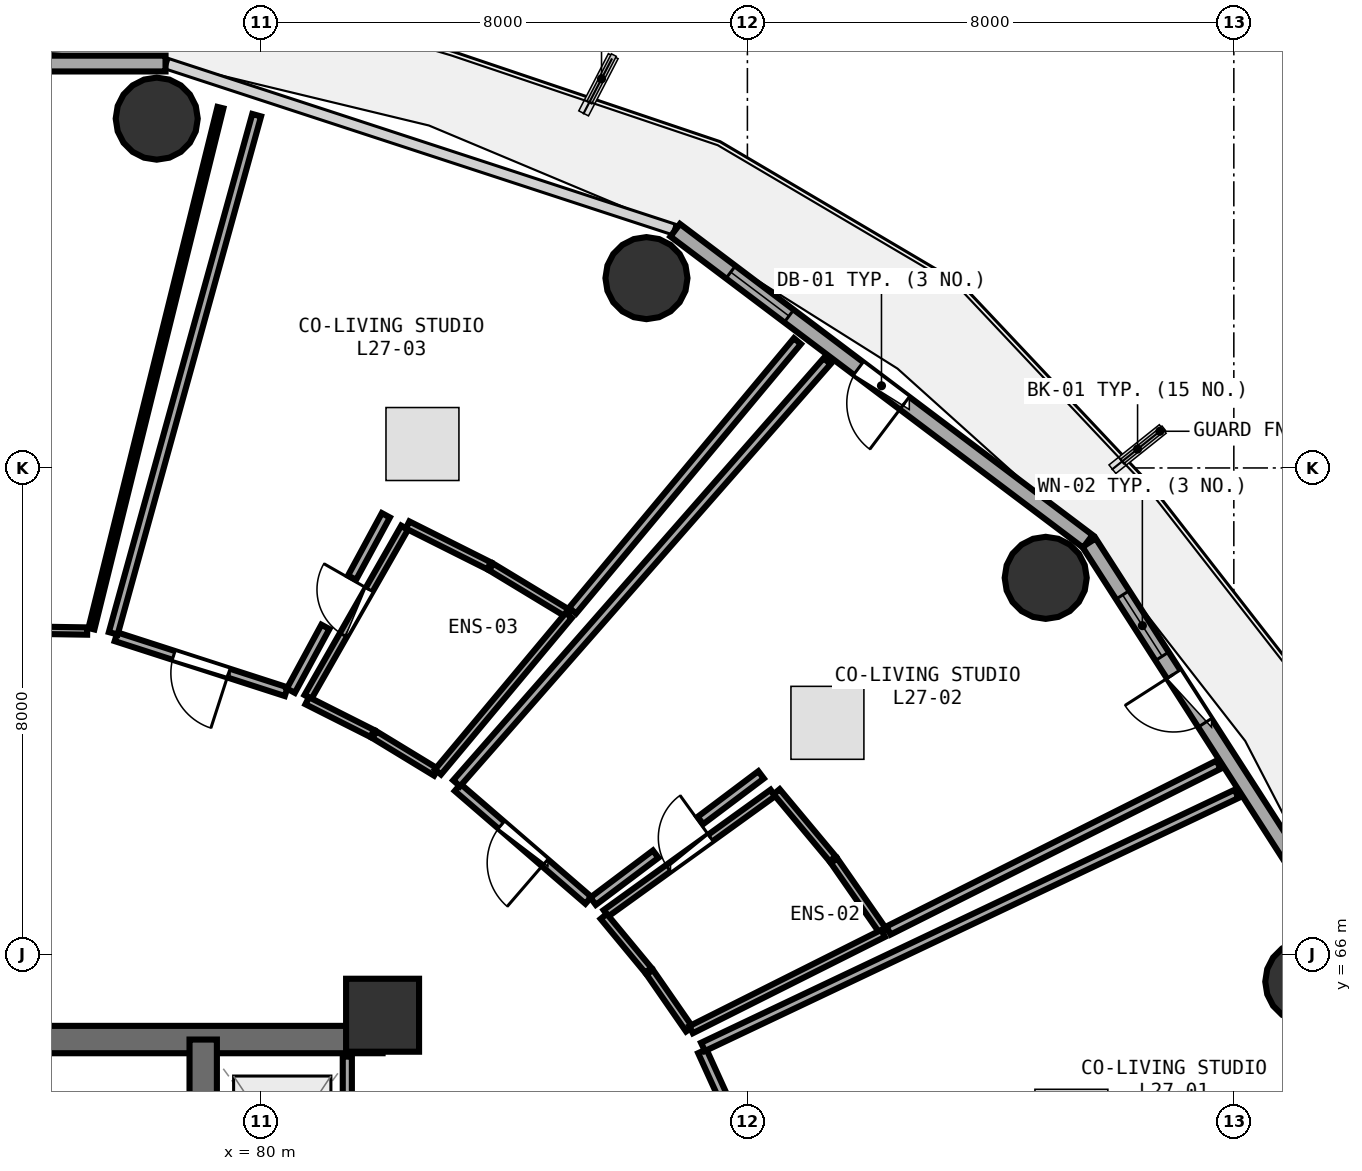
"""IFC4 building model, lengths in metres.
Left out: names, types, materials, properties, quantities, classifications, styles, units other than length and angle.
Written with IfcOpenShell. Run it as: python <this file> out.ifc"""

import sys

from ifc_helpers import new_model, si_unit, direction, frame, frame_2d, origin, origin_2d, place, context, subcontext, project, spatial, rectangle, circle, extrude, element, fill, save


model = new_model("IFC4")
c1 = context("Model", 3, precision=1e-05, world=origin(), true_north=direction((0.0, 1.0)))
c2 = subcontext(c1, "Body", "Model", "MODEL_VIEW")
j1 = project(units=[si_unit("LENGTHUNIT", "METRE"), si_unit("PLANEANGLEUNIT", "RADIAN")], contexts=[c1])
p1 = place(None, origin())
s1 = spatial("IfcSite", under=j1, at=p1, CompositionType="ELEMENT")
p2 = place(p1, origin())
s2 = spatial("IfcBuilding", under=s1, at=p2, CompositionType="ELEMENT")
p3 = place(p2, frame((0.0, 0.0, 106.35)))
s3 = spatial("IfcBuildingStorey", under=s2, at=p3, CompositionType="ELEMENT", Elevation=106.35)
p4 = place(p3, frame((82.0, 65.0, 0.0), z_axis=(0.0, 0.0, 1.0), x_axis=(1.0, 0.0, 0.0)))
e1 = element("IfcColumn", 1, at=p4, inside=s3, PredefinedType="PILASTER", context=c2, shape_type="SweptSolid", body=[
    extrude(rectangle(XDim=1.2, YDim=1.2, at=origin_2d()), origin(), (0.0, 0.0, 1.0), 3.75),
])
for number, where, z_axis, x_axis in (
    (2, (97.192, 65.552, 0.0), (0.0, 0.0, 1.0), (1.0, 0.0, 0.0)),
    (3, (92.906, 72.193, 0.0), (0.0, 0.0, 1.0), (1.0, 0.0, 0.0)),
    (4, (86.34, 77.122, 0.0), (0.0, 0.0, 1.0), (1.0, 0.0, 0.0)),
    (5, (78.286, 79.745, 0.0), (0.0, 0.0, 1.0), (1.0, 0.0, 0.0)),
):
    element("IfcColumn", number, at=place(p3, frame(where, z_axis=z_axis, x_axis=x_axis)), inside=s3, PredefinedType="COLUMN", context=c2, shape_type="SweptSolid", body=[
        extrude(circle(Radius=0.675, at=origin_2d()), origin(), (0.0, 0.0, 1.0), 3.75),
    ])
p5 = place(p3, frame((98.048, 65.879, 0.0), z_axis=(0.0, 0.0, 1.0), x_axis=(-0.540620528459, 0.841266571432, 0.0)))
e6 = element("IfcWall", 6, at=p5, inside=s3, PredefinedType="SOLIDWALL", context=c2, shape_type="SweptSolid", body=[
    extrude(rectangle(XDim=8.193, YDim=0.26, at=frame_2d((4.096, 0.0))), origin(), (0.0, 0.0, 1.0), 3.475),
])
p6 = place(p5, frame((4.671, 0.0, 0.0)))
e7 = element("IfcOpeningElement", 7, at=p6, cuts=e6, PredefinedType="OPENING", context=c2, shape_type="SweptSolid", body=[
    extrude(rectangle(XDim=0.95, YDim=2.1, at=frame_2d((0.475, 1.05))), frame((0.0, 0.14, 0.0), z_axis=(0.0, -1.0, 0.0), x_axis=(1.0, 0.0, 0.0)), (0.0, 0.0, 1.0), 0.28),
])
p7 = place(p5, frame((5.971, 0.0, 0.85)))
e8 = element("IfcOpeningElement", 8, at=p7, cuts=e6, PredefinedType="OPENING", context=c2, shape_type="SweptSolid", body=[
    extrude(rectangle(XDim=1.2, YDim=1.45, at=frame_2d((0.6, 0.725))), frame((0.0, 0.14, 0.0), z_axis=(0.0, -1.0, 0.0), x_axis=(1.0, 0.0, 0.0)), (0.0, 0.0, 1.0), 0.28),
])
p8 = place(p3, frame((93.599, 72.793, 0.0), z_axis=(0.0, 0.0, 1.0), x_axis=(-0.798501507879, 0.601992808857, 0.0)))
e9 = element("IfcWall", 9, at=p8, inside=s3, PredefinedType="SOLIDWALL", context=c2, shape_type="SweptSolid", body=[
    extrude(rectangle(XDim=8.499, YDim=0.26, at=frame_2d((4.25, 0.0))), origin(), (0.0, 0.0, 1.0), 3.475),
])
p9 = place(p8, frame((3.775, 0.0, 0.0)))
e10 = element("IfcOpeningElement", 10, at=p9, cuts=e9, PredefinedType="OPENING", context=c2, shape_type="SweptSolid", body=[
    extrude(rectangle(XDim=0.95, YDim=2.1, at=frame_2d((0.475, 1.05))), frame((0.0, 0.14, 0.0), z_axis=(0.0, -1.0, 0.0), x_axis=(1.0, 0.0, 0.0)), (0.0, 0.0, 1.0), 0.28),
])
p10 = place(p8, frame((6.155, 0.0, 0.85)))
e11 = element("IfcOpeningElement", 11, at=p10, cuts=e9, PredefinedType="OPENING", context=c2, shape_type="SweptSolid", body=[
    extrude(rectangle(XDim=1.2, YDim=1.45, at=frame_2d((0.6, 0.725))), frame((0.0, 0.14, 0.0), z_axis=(0.0, -1.0, 0.0), x_axis=(1.0, 0.0, 0.0)), (0.0, 0.0, 1.0), 0.28),
])
p11 = place(p3, frame((78.43, 80.651, 0.0), z_axis=(0.0, 0.0, 1.0), x_axis=(-1.0, 0.0, 0.0)))
e12 = element("IfcWall", 12, at=p11, inside=s3, PredefinedType="SOLIDWALL", context=c2, shape_type="SweptSolid", body=[
    extrude(rectangle(XDim=8.861, YDim=0.26, at=frame_2d((4.43, 0.0))), origin(), (0.0, 0.0, 1.0), 3.475),
])
p12 = place(p11, frame((3.63, 0.0, 0.85)))
e13 = element("IfcOpeningElement", 13, at=p12, cuts=e12, PredefinedType="OPENING", context=c2, shape_type="SweptSolid", body=[
    extrude(rectangle(XDim=1.6, YDim=1.45, at=frame_2d((0.8, 0.725))), frame((0.0, 0.14, 0.0), z_axis=(0.0, -1.0, 0.0), x_axis=(1.0, 0.0, 0.0)), (0.0, 0.0, 1.0), 0.28),
])
p13 = place(p3, frame((74.0, 64.6, 0.0), z_axis=(0.0, 0.0, 1.0), x_axis=(1.0, 0.0, 0.0)))
e14 = element("IfcWall", 14, at=p13, inside=s3, PredefinedType="SHEAR", context=c2, shape_type="SweptSolid", body=[
    extrude(rectangle(XDim=8.0, YDim=0.45, at=frame_2d((4.0, 0.0))), origin(), (0.0, 0.0, 1.0), 3.49),
])
p14 = place(p3, frame((79.05, 58.3, 0.0), z_axis=(0.0, 0.0, 1.0), x_axis=(0.0, 1.0, 0.0)))
e15 = element("IfcWall", 15, at=p14, inside=s3, PredefinedType="SHEAR", context=c2, shape_type="SweptSolid", body=[
    extrude(rectangle(XDim=6.3, YDim=0.45, at=frame_2d((3.15, 0.0))), origin(), (0.0, 0.0, 1.0), 3.49),
])
p15 = place(p3, frame((81.42, 61.48, 0.0), z_axis=(0.0, 0.0, 1.0), x_axis=(0.0, 1.0, 0.0)))
e16 = element("IfcWall", 16, at=p15, inside=s3, PredefinedType="PARTITIONING", context=c2, shape_type="SweptSolid", body=[
    extrude(rectangle(XDim=2.84, YDim=0.15, at=frame_2d((1.42, 0.0))), origin(), (0.0, 0.0, 1.0), 3.48),
])
p16 = place(p3, frame((88.387, 61.925, 0.0), z_axis=(0.0, 0.0, 1.0), x_axis=(-0.413748987938, 0.910391001153, 0.0)))
e17 = element("IfcWall", 17, at=p16, inside=s3, PredefinedType="PARTITIONING", context=c2, shape_type="SweptSolid", body=[
    extrude(rectangle(XDim=2.727, YDim=0.15, at=frame_2d((1.364, 0.0))), origin(), (0.0, 0.0, 1.0), 3.235),
])
p17 = place(p16, frame((0.889, 0.0, 0.0)))
e18 = element("IfcOpeningElement", 18, at=p17, cuts=e17, PredefinedType="OPENING", context=c2, shape_type="SweptSolid", body=[
    extrude(rectangle(XDim=0.95, YDim=2.08, at=frame_2d((0.475, 1.04))), frame((0.0, 0.085, 0.0), z_axis=(0.0, -1.0, 0.0), x_axis=(1.0, 0.0, 0.0)), (0.0, 0.0, 1.0), 0.17),
])
p18 = place(p3, frame((85.673, 66.676, 0.0), z_axis=(0.0, 0.0, 1.0), x_axis=(0.811192287952, 0.584779507137, 0.0)))
e19 = element("IfcWall", 19, at=p18, inside=s3, PredefinedType="PLUMBINGWALL", context=c2, shape_type="SweptSolid", body=[
    extrude(rectangle(XDim=3.386, YDim=0.13, at=frame_2d((1.693, 0.0))), origin(), (0.0, 0.0, 1.0), 3.235),
])
p19 = place(p18, frame((1.263, 0.0, 0.0)))
e20 = element("IfcOpeningElement", 20, at=p19, cuts=e19, PredefinedType="OPENING", context=c2, shape_type="SweptSolid", body=[
    extrude(rectangle(XDim=0.86, YDim=2.05, at=frame_2d((0.43, 1.025))), frame((0.0, 0.075, 0.0), z_axis=(0.0, -1.0, 0.0), x_axis=(1.0, 0.0, 0.0)), (0.0, 0.0, 1.0), 0.15),
])
p20 = place(p3, frame((85.385, 66.89, 0.0), z_axis=(0.0, 0.0, 1.0), x_axis=(-0.756913909666, 0.65351460072, 0.0)))
e21 = element("IfcWall", 21, at=p20, inside=s3, PredefinedType="PARTITIONING", context=c2, shape_type="SweptSolid", body=[
    extrude(rectangle(XDim=2.838, YDim=0.15, at=frame_2d((1.419, 0.0))), origin(), (0.0, 0.0, 1.0), 2.925),
])
p21 = place(p20, frame((0.944, 0.0, 0.0)))
e22 = element("IfcOpeningElement", 22, at=p21, cuts=e21, PredefinedType="OPENING", context=c2, shape_type="SweptSolid", body=[
    extrude(rectangle(XDim=0.95, YDim=2.08, at=frame_2d((0.475, 1.04))), frame((0.0, 0.085, 0.0), z_axis=(0.0, -1.0, 0.0), x_axis=(1.0, 0.0, 0.0)), (0.0, 0.0, 1.0), 0.17),
])
p22 = place(p3, frame((80.773, 70.233, 0.0), z_axis=(0.0, 0.0, 1.0), x_axis=(0.49568821927, 0.868500540747, 0.0)))
e23 = element("IfcWall", 23, at=p22, inside=s3, PredefinedType="PLUMBINGWALL", context=c2, shape_type="SweptSolid", body=[
    extrude(rectangle(XDim=3.209, YDim=0.13, at=frame_2d((1.604, 0.0))), origin(), (0.0, 0.0, 1.0), 2.925),
])
p23 = place(p22, frame((1.174, 0.0, 0.0)))
e24 = element("IfcOpeningElement", 24, at=p23, cuts=e23, PredefinedType="OPENING", context=c2, shape_type="SweptSolid", body=[
    extrude(rectangle(XDim=0.86, YDim=2.05, at=frame_2d((0.43, 1.025))), frame((0.0, 0.075, 0.0), z_axis=(0.0, -1.0, 0.0), x_axis=(1.0, 0.0, 0.0)), (0.0, 0.0, 1.0), 0.15),
])
p24 = place(p3, frame((80.415, 70.32, 0.0), z_axis=(0.0, 0.0, 1.0), x_axis=(-0.951622481895, 0.307269673009, 0.0)))
e25 = element("IfcWall", 25, at=p24, inside=s3, PredefinedType="PARTITIONING", context=c2, shape_type="SweptSolid", body=[
    extrude(rectangle(XDim=2.94, YDim=0.15, at=frame_2d((1.47, 0.0))), origin(), (0.0, 0.0, 1.0), 3.235),
])
p25 = place(p24, frame((0.995, 0.0, 0.0)))
e26 = element("IfcOpeningElement", 26, at=p25, cuts=e25, PredefinedType="OPENING", context=c2, shape_type="SweptSolid", body=[
    extrude(rectangle(XDim=0.95, YDim=2.08, at=frame_2d((0.475, 1.04))), frame((0.0, 0.085, 0.0), z_axis=(0.0, -1.0, 0.0), x_axis=(1.0, 0.0, 0.0)), (0.0, 0.0, 1.0), 0.17),
])
p26 = place(p3, frame((77.142, 71.318, 0.0), z_axis=(0.0, 0.0, 1.0), x_axis=(-0.999874771211, 0.015825356091, 0.0)))
e27 = element("IfcWall", 27, at=p26, inside=s3, PredefinedType="PARTITIONING", context=c2, shape_type="SweptSolid", body=[
    extrude(rectangle(XDim=5.77, YDim=0.12, at=frame_2d((2.885, 0.0))), origin(), (0.0, 0.0, 1.0), 3.48),
])
p27 = place(p26, frame((2.435, 0.0, 0.0)))
e28 = element("IfcOpeningElement", 28, at=p27, cuts=e27, PredefinedType="OPENING", context=c2, shape_type="SweptSolid", body=[
    extrude(rectangle(XDim=0.9, YDim=2.08, at=frame_2d((0.45, 1.04))), frame((0.0, 0.07, 0.0), z_axis=(0.0, -1.0, 0.0), x_axis=(1.0, 0.0, 0.0)), (0.0, 0.0, 1.0), 0.14),
])
p28 = place(p3, frame((87.27, 64.479, 0.0), z_axis=(0.0, 0.0, 1.0), x_axis=(0.903543765611, 0.428495815178, 0.0)))
e29 = element("IfcWall", 29, at=p28, inside=s3, PredefinedType="PARTITIONING", context=c2, shape_type="SweptSolid", body=[
    extrude(rectangle(XDim=9.713, YDim=0.15, at=frame_2d((4.856, 0.0))), origin(), (0.0, 0.0, 1.0), 2.925),
])
p29 = place(p3, frame((87.045, 64.769, 0.0), z_axis=(0.0, 0.0, 1.0), x_axis=(-0.569710294604, 0.821845593906, 0.0)))
e30 = element("IfcWall", 30, at=p29, inside=s3, PredefinedType="PLUMBINGWALL", context=c2, shape_type="SweptSolid", body=[
    extrude(rectangle(XDim=1.142, YDim=0.13, at=frame_2d((0.571, 0.0))), origin(), (0.0, 0.0, 1.0), 2.925),
])
p30 = place(p3, frame((86.37, 65.74, 0.0), z_axis=(0.0, 0.0, 1.0), x_axis=(-0.63765459476, 0.770322411579, 0.0)))
e31 = element("IfcWall", 31, at=p30, inside=s3, PredefinedType="PLUMBINGWALL", context=c2, shape_type="SweptSolid", body=[
    extrude(rectangle(XDim=1.15, YDim=0.13, at=frame_2d((0.575, 0.0))), origin(), (0.0, 0.0, 1.0), 3.48),
])
p31 = place(p3, frame((88.481, 68.676, 0.0), z_axis=(0.0, 0.0, 1.0), x_axis=(0.640685734907, -0.767803222894, 0.0)))
e32 = element("IfcWall", 32, at=p31, inside=s3, PredefinedType="PLUMBINGWALL", context=c2, shape_type="SweptSolid", body=[
    extrude(rectangle(XDim=1.437, YDim=0.13, at=frame_2d((0.718, 0.0))), origin(), (0.0, 0.0, 1.0), 3.48),
])
p32 = place(p3, frame((89.425, 67.541, 0.0), z_axis=(0.0, 0.0, 1.0), x_axis=(0.571009238548, -0.820943633566, 0.0)))
e33 = element("IfcWall", 33, at=p32, inside=s3, PredefinedType="PLUMBINGWALL", context=c2, shape_type="SweptSolid", body=[
    extrude(rectangle(XDim=1.424, YDim=0.13, at=frame_2d((0.712, 0.0))), origin(), (0.0, 0.0, 1.0), 3.48),
])
p33 = place(p3, frame((90.232, 66.346, 0.0), z_axis=(0.0, 0.0, 1.0), x_axis=(-0.893873710096, -0.448318849034, 0.0)))
e34 = element("IfcWall", 34, at=p33, inside=s3, PredefinedType="PLUMBINGWALL", context=c2, shape_type="SweptSolid", body=[
    extrude(rectangle(XDim=3.533, YDim=0.13, at=frame_2d((1.767, 0.0))), origin(), (0.0, 0.0, 1.0), 2.925),
])
p34 = place(p3, frame((83.217, 68.814, 0.0), z_axis=(0.0, 0.0, 1.0), x_axis=(0.659635901966, 0.751585309088, 0.0)))
e35 = element("IfcWall", 35, at=p34, inside=s3, PredefinedType="PARTITIONING", context=c2, shape_type="SweptSolid", body=[
    extrude(rectangle(XDim=9.237, YDim=0.15, at=frame_2d((4.619, 0.0))), origin(), (0.0, 0.0, 1.0), 2.925),
])
p35 = place(p3, frame((95.749, 69.12, 0.0), z_axis=(0.0, 0.0, 1.0), x_axis=(-0.89358164897, -0.448900697954, 0.0)))
e36 = element("IfcWall", 36, at=p35, inside=s3, PredefinedType="PARTITIONING", context=c2, shape_type="SweptSolid", body=[
    extrude(rectangle(XDim=6.075, YDim=0.15, at=frame_2d((3.038, 0.0))), origin(), (0.0, 0.0, 1.0), 2.975),
])
p36 = place(p3, frame((88.225, 68.953, 0.0), z_axis=(0.0, 0.0, 1.0), x_axis=(-0.799225323022, -0.601031515846, 0.0)))
e37 = element("IfcWall", 37, at=p36, inside=s3, PredefinedType="PARTITIONING", context=c2, shape_type="SweptSolid", body=[
    extrude(rectangle(XDim=1.249, YDim=0.15, at=frame_2d((0.625, 0.0))), origin(), (0.0, 0.0, 1.0), 2.925),
])
p37 = place(p3, frame((86.491, 67.649, 0.0), z_axis=(0.0, 0.0, 1.0), x_axis=(-0.799180360415, -0.601091300492, 0.0)))
e38 = element("IfcWall", 38, at=p37, inside=s3, PredefinedType="PARTITIONING", context=c2, shape_type="SweptSolid", body=[
    extrude(rectangle(XDim=1.288, YDim=0.15, at=frame_2d((0.644, 0.0))), origin(), (0.0, 0.0, 1.0), 3.235),
])
p38 = place(p3, frame((82.881, 68.995, 0.0), z_axis=(0.0, 0.0, 1.0), x_axis=(-0.854269908405, 0.51982970634, 0.0)))
e39 = element("IfcWall", 39, at=p38, inside=s3, PredefinedType="PLUMBINGWALL", context=c2, shape_type="SweptSolid", body=[
    extrude(rectangle(XDim=1.189, YDim=0.13, at=frame_2d((0.595, 0.0))), origin(), (0.0, 0.0, 1.0), 3.48),
])
p39 = place(p3, frame((81.83, 69.633, 0.0), z_axis=(0.0, 0.0, 1.0), x_axis=(-0.89291318054, 0.450228888475, 0.0)))
e40 = element("IfcWall", 40, at=p39, inside=s3, PredefinedType="PLUMBINGWALL", context=c2, shape_type="SweptSolid", body=[
    extrude(rectangle(XDim=1.197, YDim=0.13, at=frame_2d((0.599, 0.0))), origin(), (0.0, 0.0, 1.0), 2.925),
])
p40 = place(p3, frame((82.411, 73.063, 0.0), z_axis=(0.0, 0.0, 1.0), x_axis=(0.893970784776, -0.448125245848, 0.0)))
e41 = element("IfcWall", 41, at=p40, inside=s3, PredefinedType="PLUMBINGWALL", context=c2, shape_type="SweptSolid", body=[
    extrude(rectangle(XDim=1.499, YDim=0.13, at=frame_2d((0.75, 0.0))), origin(), (0.0, 0.0, 1.0), 3.175),
])
p41 = place(p3, frame((83.786, 72.372, 0.0), z_axis=(0.0, 0.0, 1.0), x_axis=(0.855341160713, -0.518065149175, 0.0)))
e42 = element("IfcWall", 42, at=p41, inside=s3, PredefinedType="PLUMBINGWALL", context=c2, shape_type="SweptSolid", body=[
    extrude(rectangle(XDim=1.487, YDim=0.13, at=frame_2d((0.743, 0.0))), origin(), (0.0, 0.0, 1.0), 2.925),
])
p42 = place(p3, frame((85.062, 71.576, 0.0), z_axis=(0.0, 0.0, 1.0), x_axis=(-0.641092758396, -0.767463403123, 0.0)))
e43 = element("IfcWall", 43, at=p42, inside=s3, PredefinedType="PLUMBINGWALL", context=c2, shape_type="SweptSolid", body=[
    extrude(rectangle(XDim=3.356, YDim=0.13, at=frame_2d((1.678, 0.0))), origin(), (0.0, 0.0, 1.0), 2.925),
])
p43 = place(p3, frame((77.571, 71.281, 0.0), z_axis=(0.0, 0.0, 1.0), x_axis=(0.266746506471, 0.963766725554, 0.0)))
e44 = element("IfcWall", 44, at=p43, inside=s3, PredefinedType="PARTITIONING", context=c2, shape_type="SweptSolid", body=[
    extrude(rectangle(XDim=8.841, YDim=0.15, at=frame_2d((4.421, 0.0))), origin(), (0.0, 0.0, 1.0), 2.925),
])
p44 = place(p3, frame((88.823, 76.086, 0.0), z_axis=(0.0, 0.0, 1.0), x_axis=(-0.640629420745, -0.767850210182, 0.0)))
e45 = element("IfcWall", 45, at=p44, inside=s3, PredefinedType="PARTITIONING", context=c2, shape_type="SweptSolid", body=[
    extrude(rectangle(XDim=5.772, YDim=0.15, at=frame_2d((2.886, 0.0))), origin(), (0.0, 0.0, 1.0), 2.975),
])
p45 = place(p3, frame((82.054, 73.222, 0.0), z_axis=(0.0, 0.0, 1.0), x_axis=(-0.476431432847, -0.879211629698, 0.0)))
e46 = element("IfcWall", 46, at=p45, inside=s3, PredefinedType="PARTITIONING", context=c2, shape_type="SweptSolid", body=[
    extrude(rectangle(XDim=1.167, YDim=0.15, at=frame_2d((0.583, 0.0))), origin(), (0.0, 0.0, 1.0), 3.175),
])
p46 = place(p3, frame((81.06, 71.387, 0.0), z_axis=(0.0, 0.0, 1.0), x_axis=(-0.476184304259, -0.879345500004, 0.0)))
e47 = element("IfcWall", 47, at=p46, inside=s3, PredefinedType="PARTITIONING", context=c2, shape_type="SweptSolid", body=[
    extrude(rectangle(XDim=1.194, YDim=0.15, at=frame_2d((0.597, 0.0))), origin(), (0.0, 0.0, 1.0), 2.925),
])
p47 = place(p3, frame((79.333, 79.925, 0.0), z_axis=(0.0, 0.0, 1.0), x_axis=(-0.240342194274, -0.970688224741, 0.0)))
e48 = element("IfcWall", 48, at=p47, inside=s3, PredefinedType="PARTITIONING", context=c2, shape_type="SweptSolid", body=[
    extrude(rectangle(XDim=8.828, YDim=0.1, at=frame_2d((4.414, 0.0))), origin(), (0.0, 0.0, 1.0), 2.925),
])
p48 = place(p6, frame((0.95, 0.0, 0.0), z_axis=(0.0, 0.0, 1.0), x_axis=(-1.0, 0.0, 0.0)))
e49 = element("IfcDoor", 49, at=p48, inside=s3, OperationType="SINGLE_SWING_LEFT", PredefinedType="DOOR", context=c2, shape_type="SweptSolid", body=[
    extrude(rectangle(XDim=0.95, YDim=2.1, at=frame_2d((0.475, 1.05))), frame((0.0, 0.025, 0.0), z_axis=(0.0, -1.0, 0.0), x_axis=(1.0, 0.0, 0.0)), (0.0, 0.0, 1.0), 0.05),
])
fill(e7, e49)
p49 = place(p7, origin())
e50 = element("IfcWindow", 50, at=p49, inside=s3, PartitioningType="SINGLE_PANEL", PredefinedType="WINDOW", context=c2, shape_type="SweptSolid", body=[
    extrude(rectangle(XDim=1.2, YDim=1.45, at=frame_2d((0.6, 0.725))), frame((0.0, 0.03, 0.0), z_axis=(0.0, -1.0, 0.0), x_axis=(1.0, 0.0, 0.0)), (0.0, 0.0, 1.0), 0.06),
])
fill(e8, e50)
p50 = place(p9, frame((0.95, 0.0, 0.0), z_axis=(0.0, 0.0, 1.0), x_axis=(-1.0, 0.0, 0.0)))
e51 = element("IfcDoor", 51, at=p50, inside=s3, OperationType="SINGLE_SWING_RIGHT", PredefinedType="DOOR", context=c2, shape_type="SweptSolid", body=[
    extrude(rectangle(XDim=0.95, YDim=2.1, at=frame_2d((0.475, 1.05))), frame((0.0, 0.025, 0.0), z_axis=(0.0, -1.0, 0.0), x_axis=(1.0, 0.0, 0.0)), (0.0, 0.0, 1.0), 0.05),
])
fill(e10, e51)
p51 = place(p10, origin())
e52 = element("IfcWindow", 52, at=p51, inside=s3, PartitioningType="SINGLE_PANEL", PredefinedType="WINDOW", context=c2, shape_type="SweptSolid", body=[
    extrude(rectangle(XDim=1.2, YDim=1.45, at=frame_2d((0.6, 0.725))), frame((0.0, 0.03, 0.0), z_axis=(0.0, -1.0, 0.0), x_axis=(1.0, 0.0, 0.0)), (0.0, 0.0, 1.0), 0.06),
])
fill(e11, e52)
p52 = place(p19, origin())
e53 = element("IfcDoor", 53, at=p52, inside=s3, OperationType="SINGLE_SWING_RIGHT", PredefinedType="DOOR", context=c2, shape_type="SweptSolid", body=[
    extrude(rectangle(XDim=0.86, YDim=2.05, at=frame_2d((0.43, 1.025))), frame((0.0, 0.025, 0.0), z_axis=(0.0, -1.0, 0.0), x_axis=(1.0, 0.0, 0.0)), (0.0, 0.0, 1.0), 0.05),
])
fill(e20, e53)
p53 = place(p21, origin())
e54 = element("IfcDoor", 54, at=p53, inside=s3, OperationType="SINGLE_SWING_LEFT", PredefinedType="DOOR", context=c2, shape_type="SweptSolid", body=[
    extrude(rectangle(XDim=0.95, YDim=2.08, at=frame_2d((0.475, 1.04))), frame((0.0, 0.025, 0.0), z_axis=(0.0, -1.0, 0.0), x_axis=(1.0, 0.0, 0.0)), (0.0, 0.0, 1.0), 0.05),
])
fill(e22, e54)
p54 = place(p23, origin())
e55 = element("IfcDoor", 55, at=p54, inside=s3, OperationType="SINGLE_SWING_RIGHT", PredefinedType="DOOR", context=c2, shape_type="SweptSolid", body=[
    extrude(rectangle(XDim=0.86, YDim=2.05, at=frame_2d((0.43, 1.025))), frame((0.0, 0.025, 0.0), z_axis=(0.0, -1.0, 0.0), x_axis=(1.0, 0.0, 0.0)), (0.0, 0.0, 1.0), 0.05),
])
fill(e24, e55)
p55 = place(p25, origin())
e56 = element("IfcDoor", 56, at=p55, inside=s3, OperationType="SINGLE_SWING_LEFT", PredefinedType="DOOR", context=c2, shape_type="SweptSolid", body=[
    extrude(rectangle(XDim=0.95, YDim=2.08, at=frame_2d((0.475, 1.04))), frame((0.0, 0.025, 0.0), z_axis=(0.0, -1.0, 0.0), x_axis=(1.0, 0.0, 0.0)), (0.0, 0.0, 1.0), 0.05),
])
fill(e26, e56)
save(model, sys.argv[1])
